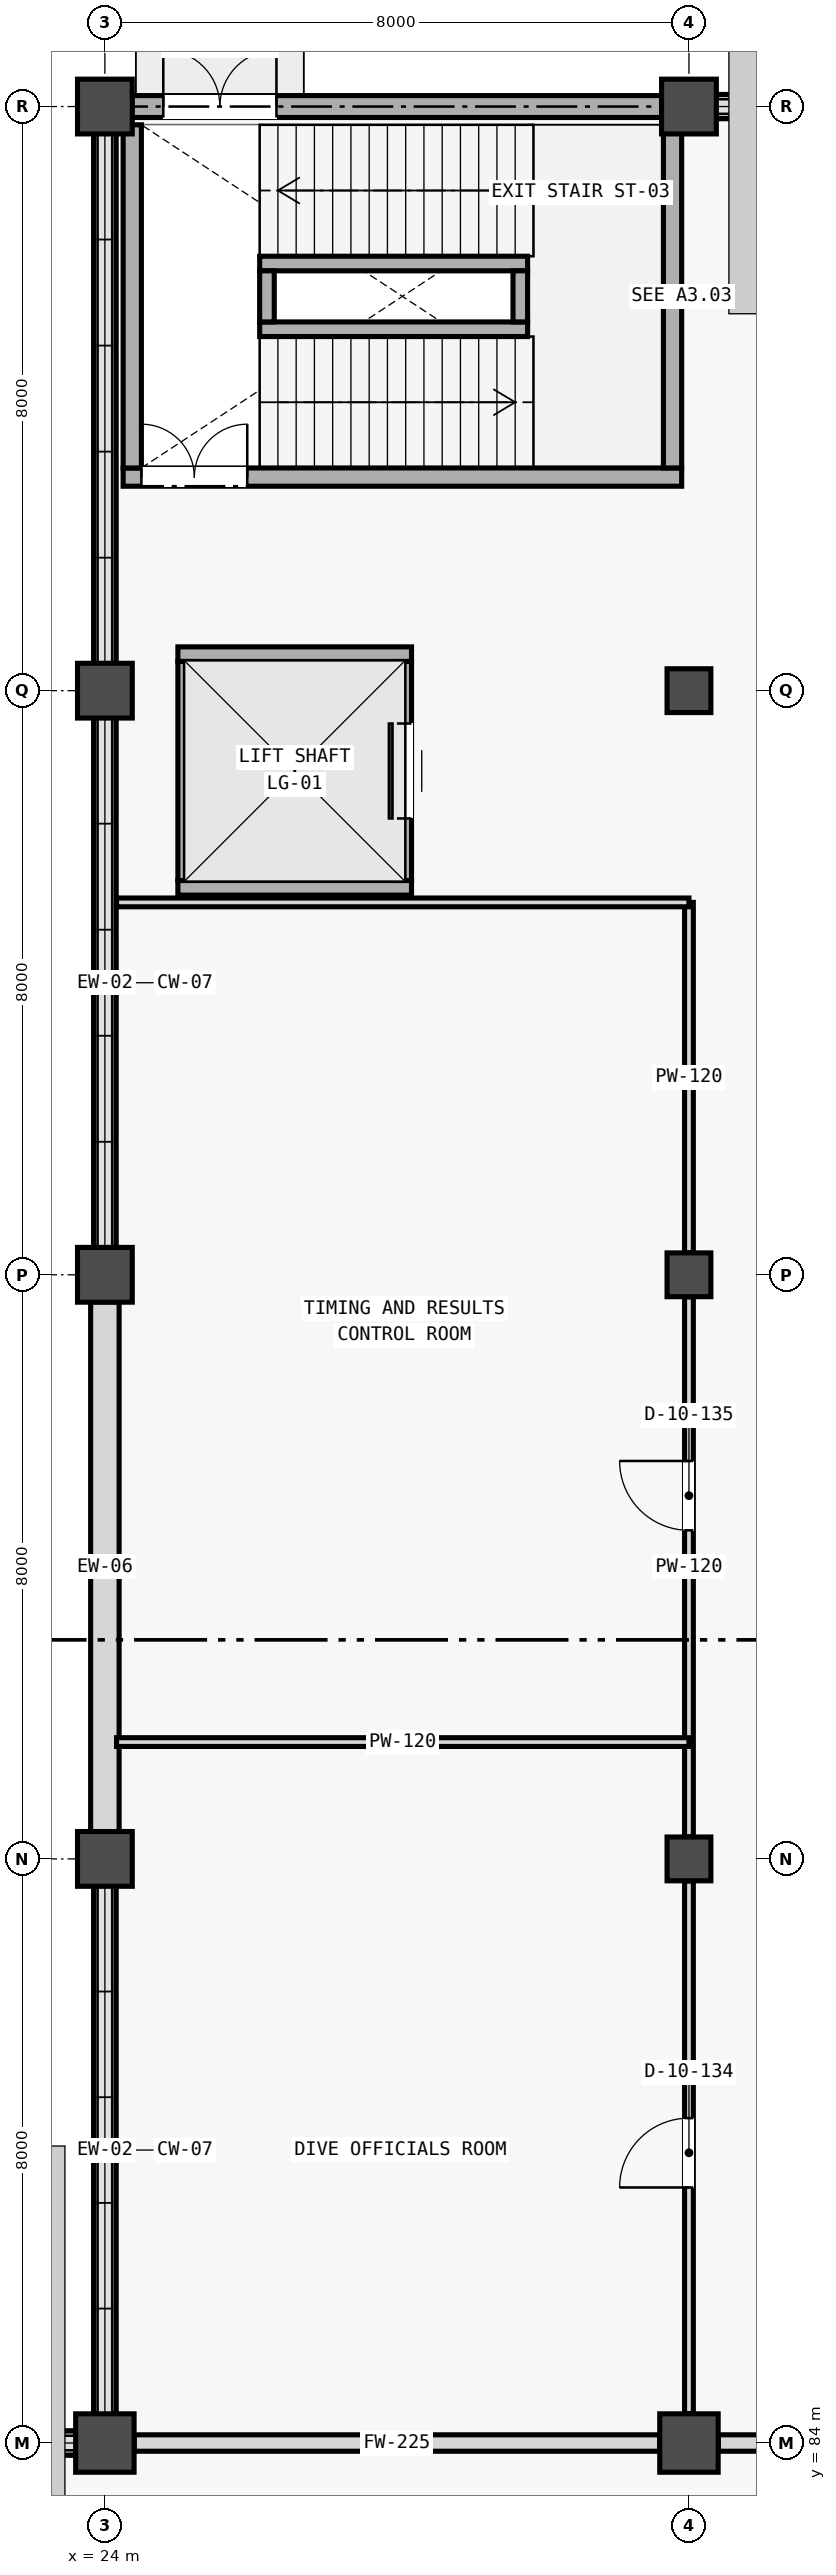
"""IFC4 building model, lengths in metres.
Left out: names, types, materials, properties, quantities, classifications, styles, units other than length and angle.
Written with IfcOpenShell. Run it as: python <this file> out.ifc"""

import sys

from ifc_helpers import new_model, si_unit, direction, frame, frame_2d, origin, origin_2d, place, context, subcontext, project, spatial, rectangle, extrude, element, fill, save


model = new_model("IFC4")
c1 = context("Model", 3, precision=1e-05, world=origin(), true_north=direction((0.0, 1.0)))
c2 = subcontext(c1, "Body", "Model", "MODEL_VIEW")
j1 = project(units=[si_unit("LENGTHUNIT", "METRE"), si_unit("PLANEANGLEUNIT", "RADIAN")], contexts=[c1])
p1 = place(None, origin())
s1 = spatial("IfcSite", under=j1, at=p1, CompositionType="ELEMENT")
p2 = place(p1, origin())
s2 = spatial("IfcBuilding", under=s1, at=p2, CompositionType="ELEMENT")
p3 = place(p2, origin())
s3 = spatial("IfcBuildingStorey", under=s2, at=p3, CompositionType="ELEMENT", Elevation=0.0)
for number, where, z_axis, x_axis in (
    (1, (24.0, 84.0, 0.0), (0.0, 0.0, 1.0), (1.0, 0.0, 0.0)),
    (2, (32.0, 84.0, 0.0), (0.0, 0.0, 1.0), (1.0, 0.0, 0.0)),
):
    element("IfcColumn", number, at=place(p3, frame(where, z_axis=z_axis, x_axis=x_axis)), inside=s3, PredefinedType="COLUMN", context=c2, shape_type="SweptSolid", body=[
        extrude(rectangle(XDim=0.8, YDim=0.8, at=origin_2d()), origin(), (0.0, 0.0, 1.0), 5.125),
    ])
for number, where, z_axis, x_axis in (
    (3, (24.0, 116.0, 0.0), (0.0, 0.0, 1.0), (1.0, 0.0, 0.0)),
    (4, (32.0, 116.0, 0.0), (0.0, 0.0, 1.0), (1.0, 0.0, 0.0)),
    (5, (24.0, 92.0, 0.0), (0.0, 0.0, 1.0), (1.0, 0.0, 0.0)),
):
    element("IfcColumn", number, at=place(p3, frame(where, z_axis=z_axis, x_axis=x_axis)), inside=s3, PredefinedType="COLUMN", context=c2, shape_type="SweptSolid", body=[
        extrude(rectangle(XDim=0.75, YDim=0.75, at=origin_2d()), origin(), (0.0, 0.0, 1.0), 5.125),
    ])
p4 = place(p3, frame((32.0, 92.0, 0.0), z_axis=(0.0, 0.0, 1.0), x_axis=(1.0, 0.0, 0.0)))
e6 = element("IfcColumn", 6, at=p4, inside=s3, PredefinedType="COLUMN", context=c2, shape_type="SweptSolid", body=[
    extrude(rectangle(XDim=0.6, YDim=0.6, at=origin_2d()), origin(), (0.0, 0.0, 1.0), 5.125),
])
p5 = place(p3, frame((24.0, 100.0, 0.0), z_axis=(0.0, 0.0, 1.0), x_axis=(1.0, 0.0, 0.0)))
e7 = element("IfcColumn", 7, at=p5, inside=s3, PredefinedType="COLUMN", context=c2, shape_type="SweptSolid", body=[
    extrude(rectangle(XDim=0.75, YDim=0.75, at=origin_2d()), origin(), (0.0, 0.0, 1.0), 5.125),
])
p6 = place(p3, frame((32.0, 100.0, 0.0), z_axis=(0.0, 0.0, 1.0), x_axis=(1.0, 0.0, 0.0)))
e8 = element("IfcColumn", 8, at=p6, inside=s3, PredefinedType="COLUMN", context=c2, shape_type="SweptSolid", body=[
    extrude(rectangle(XDim=0.6, YDim=0.6, at=origin_2d()), origin(), (0.0, 0.0, 1.0), 5.125),
])
p7 = place(p3, frame((24.0, 108.0, 0.0), z_axis=(0.0, 0.0, 1.0), x_axis=(1.0, 0.0, 0.0)))
e9 = element("IfcColumn", 9, at=p7, inside=s3, PredefinedType="COLUMN", context=c2, shape_type="SweptSolid", body=[
    extrude(rectangle(XDim=0.75, YDim=0.75, at=origin_2d()), origin(), (0.0, 0.0, 1.0), 5.125),
])
p8 = place(p3, frame((32.0, 108.0, 0.0), z_axis=(0.0, 0.0, 1.0), x_axis=(1.0, 0.0, 0.0)))
e10 = element("IfcColumn", 10, at=p8, inside=s3, PredefinedType="COLUMN", context=c2, shape_type="SweptSolid", body=[
    extrude(rectangle(XDim=0.6, YDim=0.6, at=origin_2d()), origin(), (0.0, 0.0, 1.0), 5.125),
])
p9 = place(p3, frame((16.396, 84.0, 0.0), z_axis=(0.0, 0.0, 1.0), x_axis=(1.0, 0.0, 0.0)))
e11 = element("IfcWall", 11, at=p9, inside=s3, PredefinedType="STANDARD", context=c2, shape_type="SweptSolid", body=[
    extrude(rectangle(XDim=7.208, YDim=0.33, at=frame_2d((3.604, 0.0))), origin(), (0.0, 0.0, 1.0), 0.85),
])
p10 = place(p3, frame((16.396, 84.0, 3.35), z_axis=(0.0, 0.0, 1.0), x_axis=(1.0, 0.0, 0.0)))
e12 = element("IfcWall", 12, at=p10, inside=s3, PredefinedType="STANDARD", context=c2, shape_type="SweptSolid", body=[
    extrude(rectangle(XDim=7.208, YDim=0.33, at=frame_2d((3.604, 0.0))), origin(), (0.0, 0.0, 1.0), 0.955),
])
p11 = place(p3, frame((24.371, 116.0, 0.0), z_axis=(0.0, 0.0, 1.0), x_axis=(1.0, 0.0, 0.0)))
e13 = element("IfcWall", 13, at=p11, inside=s3, PredefinedType="SHEAR", context=c2, shape_type="SweptSolid", body=[
    extrude(rectangle(XDim=7.258, YDim=0.3, at=frame_2d((3.629, 0.0))), origin(), (0.0, 0.0, 1.0), 5.4),
])
p12 = place(p11, frame((0.429, 0.0, 0.0)))
e14 = element("IfcOpeningElement", 14, at=p12, cuts=e13, PredefinedType="OPENING", context=c2, shape_type="SweptSolid", body=[
    extrude(rectangle(XDim=1.55, YDim=2.2, at=frame_2d((0.775, 1.1))), frame((0.0, 0.16, 0.0), z_axis=(0.0, -1.0, 0.0), x_axis=(1.0, 0.0, 0.0)), (0.0, 0.0, 1.0), 0.32),
])
p13 = place(p3, frame((32.371, 116.0, 0.0), z_axis=(0.0, 0.0, 1.0), x_axis=(1.0, 0.0, 0.0)))
e15 = element("IfcWall", 15, at=p13, inside=s3, PredefinedType="STANDARD", context=c2, shape_type="SweptSolid", body=[
    extrude(rectangle(XDim=7.258, YDim=0.33, at=frame_2d((3.629, 0.0))), origin(), (0.0, 0.0, 1.0), 0.85),
])
p14 = place(p3, frame((32.371, 116.0, 2.55), z_axis=(0.0, 0.0, 1.0), x_axis=(1.0, 0.0, 0.0)))
e16 = element("IfcWall", 16, at=p14, inside=s3, PredefinedType="STANDARD", context=c2, shape_type="SweptSolid", body=[
    extrude(rectangle(XDim=7.258, YDim=0.33, at=frame_2d((3.629, 0.0))), origin(), (0.0, 0.0, 1.0), 2.84),
])
p15 = place(p3, frame((24.0, 84.396, 0.0), z_axis=(0.0, 0.0, 1.0), x_axis=(0.0, 1.0, 0.0)))
e17 = element("IfcWall", 17, at=p15, inside=s3, PredefinedType="STANDARD", context=c2, shape_type="SweptSolid", body=[
    extrude(rectangle(XDim=7.233, YDim=0.31, at=frame_2d((3.616, 0.0))), origin(), (0.0, 0.0, 1.0), 0.85),
])
p16 = place(p3, frame((24.0, 92.371, 0.0), z_axis=(0.0, 0.0, 1.0), x_axis=(0.0, 1.0, 0.0)))
e18 = element("IfcWall", 18, at=p16, inside=s3, PredefinedType="STANDARD", context=c2, shape_type="SweptSolid", body=[
    extrude(rectangle(XDim=7.258, YDim=0.39, at=frame_2d((3.629, 0.0))), origin(), (0.0, 0.0, 1.0), 4.555),
])
for number, where, z_axis, x_axis in (
    (19, (24.0, 100.371, 0.0), (0.0, 0.0, 1.0), (0.0, 1.0, 0.0)),
    (20, (24.0, 108.371, 0.0), (0.0, 0.0, 1.0), (0.0, 1.0, 0.0)),
):
    element("IfcWall", number, at=place(p3, frame(where, z_axis=z_axis, x_axis=x_axis)), inside=s3, PredefinedType="STANDARD", context=c2, shape_type="SweptSolid", body=[
        extrude(rectangle(XDim=7.258, YDim=0.31, at=frame_2d((3.629, 0.0))), origin(), (0.0, 0.0, 1.0), 0.85),
    ])
p17 = place(p3, frame((24.25, 110.925, 0.0), z_axis=(0.0, 0.0, 1.0), x_axis=(1.0, 0.0, 0.0)))
e21 = element("IfcWall", 21, at=p17, inside=s3, PredefinedType="SHEAR", context=c2, shape_type="SweptSolid", body=[
    extrude(rectangle(XDim=7.65, YDim=0.25, at=frame_2d((3.825, 0.0))), origin(), (0.0, 0.0, 1.0), 5.4),
])
p18 = place(p17, frame((0.25, 0.0, 0.0)))
e22 = element("IfcOpeningElement", 22, at=p18, cuts=e21, PredefinedType="OPENING", context=c2, shape_type="SweptSolid", body=[
    extrude(rectangle(XDim=1.45, YDim=2.2, at=frame_2d((0.725, 1.1))), frame((0.0, 0.135, 0.0), z_axis=(0.0, -1.0, 0.0), x_axis=(1.0, 0.0, 0.0)), (0.0, 0.0, 1.0), 0.27),
])
for number, where, z_axis, x_axis in (
    (23, (24.375, 111.05, 0.0), (0.0, 0.0, 1.0), (0.0, 1.0, 0.0)),
    (24, (31.775, 111.05, 0.0), (0.0, 0.0, 1.0), (0.0, 1.0, 0.0)),
):
    element("IfcWall", number, at=place(p3, frame(where, z_axis=z_axis, x_axis=x_axis)), inside=s3, PredefinedType="SHEAR", context=c2, shape_type="SweptSolid", body=[
        extrude(rectangle(XDim=4.7, YDim=0.25, at=frame_2d((2.35, 0.0))), origin(), (0.0, 0.0, 1.0), 5.4),
    ])
for number, where, z_axis, x_axis in (
    (25, (26.12, 112.95, 0.0), (0.0, 0.0, 1.0), (1.0, 0.0, 0.0)),
    (26, (26.12, 113.85, 0.0), (0.0, 0.0, 1.0), (1.0, 0.0, 0.0)),
):
    element("IfcWall", number, at=place(p3, frame(where, z_axis=z_axis, x_axis=x_axis)), inside=s3, PredefinedType="SHEAR", context=c2, shape_type="SweptSolid", body=[
        extrude(rectangle(XDim=3.67, YDim=0.2, at=frame_2d((1.835, 0.0))), origin(), (0.0, 0.0, 1.0), 5.4),
    ])
for number, where, z_axis, x_axis in (
    (27, (26.22, 113.05, 0.0), (0.0, 0.0, 1.0), (0.0, 1.0, 0.0)),
    (28, (29.69, 113.05, 0.0), (0.0, 0.0, 1.0), (0.0, 1.0, 0.0)),
):
    element("IfcWall", number, at=place(p3, frame(where, z_axis=z_axis, x_axis=x_axis)), inside=s3, PredefinedType="SHEAR", context=c2, shape_type="SweptSolid", body=[
        extrude(rectangle(XDim=0.7, YDim=0.2, at=frame_2d((0.35, 0.0))), origin(), (0.0, 0.0, 1.0), 5.4),
    ])
for number, where, z_axis, x_axis in (
    (29, (25.0, 105.3, 0.0), (0.0, 0.0, 1.0), (1.0, 0.0, 0.0)),
    (30, (25.0, 108.5, 0.0), (0.0, 0.0, 1.0), (1.0, 0.0, 0.0)),
):
    element("IfcWall", number, at=place(p3, frame(where, z_axis=z_axis, x_axis=x_axis)), inside=s3, PredefinedType="SHEAR", context=c2, shape_type="SweptSolid", body=[
        extrude(rectangle(XDim=3.2, YDim=0.2, at=frame_2d((1.6, 0.0))), origin(), (0.0, 0.0, 1.0), 5.4),
    ])
p19 = place(p3, frame((25.1, 105.4, 0.0), z_axis=(0.0, 0.0, 1.0), x_axis=(0.0, 1.0, 0.0)))
e31 = element("IfcWall", 31, at=p19, inside=s3, PredefinedType="SHEAR", context=c2, shape_type="SweptSolid", body=[
    extrude(rectangle(XDim=3.0, YDim=0.2, at=frame_2d((1.5, 0.0))), origin(), (0.0, 0.0, 1.0), 5.4),
])
p20 = place(p3, frame((28.1, 105.4, 0.0), z_axis=(0.0, 0.0, 1.0), x_axis=(0.0, 1.0, 0.0)))
e32 = element("IfcWall", 32, at=p20, inside=s3, PredefinedType="SHEAR", context=c2, shape_type="SweptSolid", body=[
    extrude(rectangle(XDim=3.0, YDim=0.2, at=frame_2d((1.5, 0.0))), origin(), (0.0, 0.0, 1.0), 5.4),
])
p21 = place(p20, frame((0.85, 0.0, 0.0)))
e33 = element("IfcOpeningElement", 33, at=p21, cuts=e32, PredefinedType="OPENING", context=c2, shape_type="SweptSolid", body=[
    extrude(rectangle(XDim=1.3, YDim=2.3, at=frame_2d((0.65, 1.15))), frame((0.0, 0.11, 0.0), z_axis=(0.0, -1.0, 0.0), x_axis=(1.0, 0.0, 0.0)), (0.0, 0.0, 1.0), 0.22),
])
p22 = place(p3, frame((24.402, 84.0, 0.0), z_axis=(0.0, 0.0, 1.0), x_axis=(1.0, 0.0, 0.0)))
e34 = element("IfcWall", 34, at=p22, inside=s3, PredefinedType="STANDARD", context=c2, shape_type="SweptSolid", body=[
    extrude(rectangle(XDim=7.196, YDim=0.225, at=frame_2d((3.598, 0.0))), origin(), (0.0, 0.0, 1.0), 4.305),
])
p23 = place(p3, frame((32.402, 84.0, 0.0), z_axis=(0.0, 0.0, 1.0), x_axis=(1.0, 0.0, 0.0)))
e35 = element("IfcWall", 35, at=p23, inside=s3, PredefinedType="STANDARD", context=c2, shape_type="SweptSolid", body=[
    extrude(rectangle(XDim=7.196, YDim=0.225, at=frame_2d((3.598, 0.0))), origin(), (0.0, 0.0, 1.0), 4.305),
])
p24 = place(p23, frame((2.098, 0.0, 0.0)))
e36 = element("IfcOpeningElement", 36, at=p24, cuts=e35, PredefinedType="OPENING", context=c2, shape_type="SweptSolid", body=[
    extrude(rectangle(XDim=1.8, YDim=2.3, at=frame_2d((0.9, 1.15))), frame((0.0, 0.123, 0.0), z_axis=(0.0, -1.0, 0.0), x_axis=(1.0, 0.0, 0.0)), (0.0, 0.0, 1.0), 0.245),
])
p25 = place(p3, frame((32.0, 84.402, 0.0), z_axis=(0.0, 0.0, 1.0), x_axis=(0.0, 1.0, 0.0)))
e37 = element("IfcWall", 37, at=p25, inside=s3, PredefinedType="PARTITIONING", context=c2, shape_type="SweptSolid", body=[
    extrude(rectangle(XDim=7.296, YDim=0.12, at=frame_2d((3.648, 0.0))), origin(), (0.0, 0.0, 1.0), 4.405),
])
p26 = place(p25, frame((3.098, 0.0, 0.0)))
e38 = element("IfcOpeningElement", 38, at=p26, cuts=e37, PredefinedType="OPENING", context=c2, shape_type="SweptSolid", body=[
    extrude(rectangle(XDim=0.95, YDim=2.15, at=frame_2d((0.475, 1.075))), frame((0.0, 0.07, 0.0), z_axis=(0.0, -1.0, 0.0), x_axis=(1.0, 0.0, 0.0)), (0.0, 0.0, 1.0), 0.14),
])
p27 = place(p3, frame((32.0, 92.302, 0.0), z_axis=(0.0, 0.0, 1.0), x_axis=(0.0, 1.0, 0.0)))
e39 = element("IfcWall", 39, at=p27, inside=s3, PredefinedType="PARTITIONING", context=c2, shape_type="SweptSolid", body=[
    extrude(rectangle(XDim=7.396, YDim=0.12, at=frame_2d((3.698, 0.0))), origin(), (0.0, 0.0, 1.0), 4.405),
])
p28 = place(p27, frame((4.198, 0.0, 0.0)))
e40 = element("IfcOpeningElement", 40, at=p28, cuts=e39, PredefinedType="OPENING", context=c2, shape_type="SweptSolid", body=[
    extrude(rectangle(XDim=0.95, YDim=2.15, at=frame_2d((0.475, 1.075))), frame((0.0, 0.07, 0.0), z_axis=(0.0, -1.0, 0.0), x_axis=(1.0, 0.0, 0.0)), (0.0, 0.0, 1.0), 0.14),
])
p29 = place(p3, frame((32.0, 100.302, 0.0), z_axis=(0.0, 0.0, 1.0), x_axis=(0.0, 1.0, 0.0)))
e41 = element("IfcWall", 41, at=p29, inside=s3, PredefinedType="PARTITIONING", context=c2, shape_type="SweptSolid", body=[
    extrude(rectangle(XDim=4.798, YDim=0.12, at=frame_2d((2.399, 0.0))), origin(), (0.0, 0.0, 1.0), 4.405),
])
for number, where, z_axis, x_axis in (
    (42, (24.16, 93.6, 0.0), (0.0, 0.0, 1.0), (1.0, 0.0, 0.0)),
    (43, (24.16, 105.1, 0.0), (0.0, 0.0, 1.0), (1.0, 0.0, 0.0)),
):
    element("IfcWall", number, at=place(p3, frame(where, z_axis=z_axis, x_axis=x_axis)), inside=s3, PredefinedType="PARTITIONING", context=c2, shape_type="SweptSolid", body=[
        extrude(rectangle(XDim=7.84, YDim=0.12, at=frame_2d((3.92, 0.0))), origin(), (0.0, 0.0, 1.0), 4.405),
    ])
p30 = place(p12, origin())
e44 = element("IfcDoor", 44, at=p30, inside=s3, OperationType="DOUBLE_DOOR_SINGLE_SWING", PredefinedType="DOOR", context=c2, shape_type="SweptSolid", body=[
    extrude(rectangle(XDim=1.55, YDim=2.2, at=frame_2d((0.775, 1.1))), frame((0.0, 0.025, 0.0), z_axis=(0.0, -1.0, 0.0), x_axis=(1.0, 0.0, 0.0)), (0.0, 0.0, 1.0), 0.05),
])
fill(e14, e44)
p31 = place(p18, origin())
e45 = element("IfcDoor", 45, at=p31, inside=s3, OperationType="DOUBLE_DOOR_SINGLE_SWING", PredefinedType="DOOR", context=c2, shape_type="SweptSolid", body=[
    extrude(rectangle(XDim=1.45, YDim=2.2, at=frame_2d((0.725, 1.1))), frame((0.0, 0.025, 0.0), z_axis=(0.0, -1.0, 0.0), x_axis=(1.0, 0.0, 0.0)), (0.0, 0.0, 1.0), 0.05),
])
fill(e22, e45)
p32 = place(p21, origin())
e46 = element("IfcDoor", 46, at=p32, inside=s3, OperationType="SLIDING_TO_RIGHT", PredefinedType="DOOR", context=c2, shape_type="SweptSolid", body=[
    extrude(rectangle(XDim=1.3, YDim=2.3, at=frame_2d((0.65, 1.15))), frame((0.0, 0.025, 0.0), z_axis=(0.0, -1.0, 0.0), x_axis=(1.0, 0.0, 0.0)), (0.0, 0.0, 1.0), 0.05),
])
fill(e33, e46)
p33 = place(p26, origin())
e47 = element("IfcDoor", 47, at=p33, inside=s3, OperationType="SINGLE_SWING_LEFT", PredefinedType="DOOR", context=c2, shape_type="SweptSolid", body=[
    extrude(rectangle(XDim=0.95, YDim=2.15, at=frame_2d((0.475, 1.075))), frame((0.0, 0.025, 0.0), z_axis=(0.0, -1.0, 0.0), x_axis=(1.0, 0.0, 0.0)), (0.0, 0.0, 1.0), 0.05),
])
fill(e38, e47)
p34 = place(p28, origin())
e48 = element("IfcDoor", 48, at=p34, inside=s3, OperationType="SINGLE_SWING_RIGHT", PredefinedType="DOOR", context=c2, shape_type="SweptSolid", body=[
    extrude(rectangle(XDim=0.95, YDim=2.15, at=frame_2d((0.475, 1.075))), frame((0.0, 0.025, 0.0), z_axis=(0.0, -1.0, 0.0), x_axis=(1.0, 0.0, 0.0)), (0.0, 0.0, 1.0), 0.05),
])
fill(e40, e48)
save(model, sys.argv[1])
